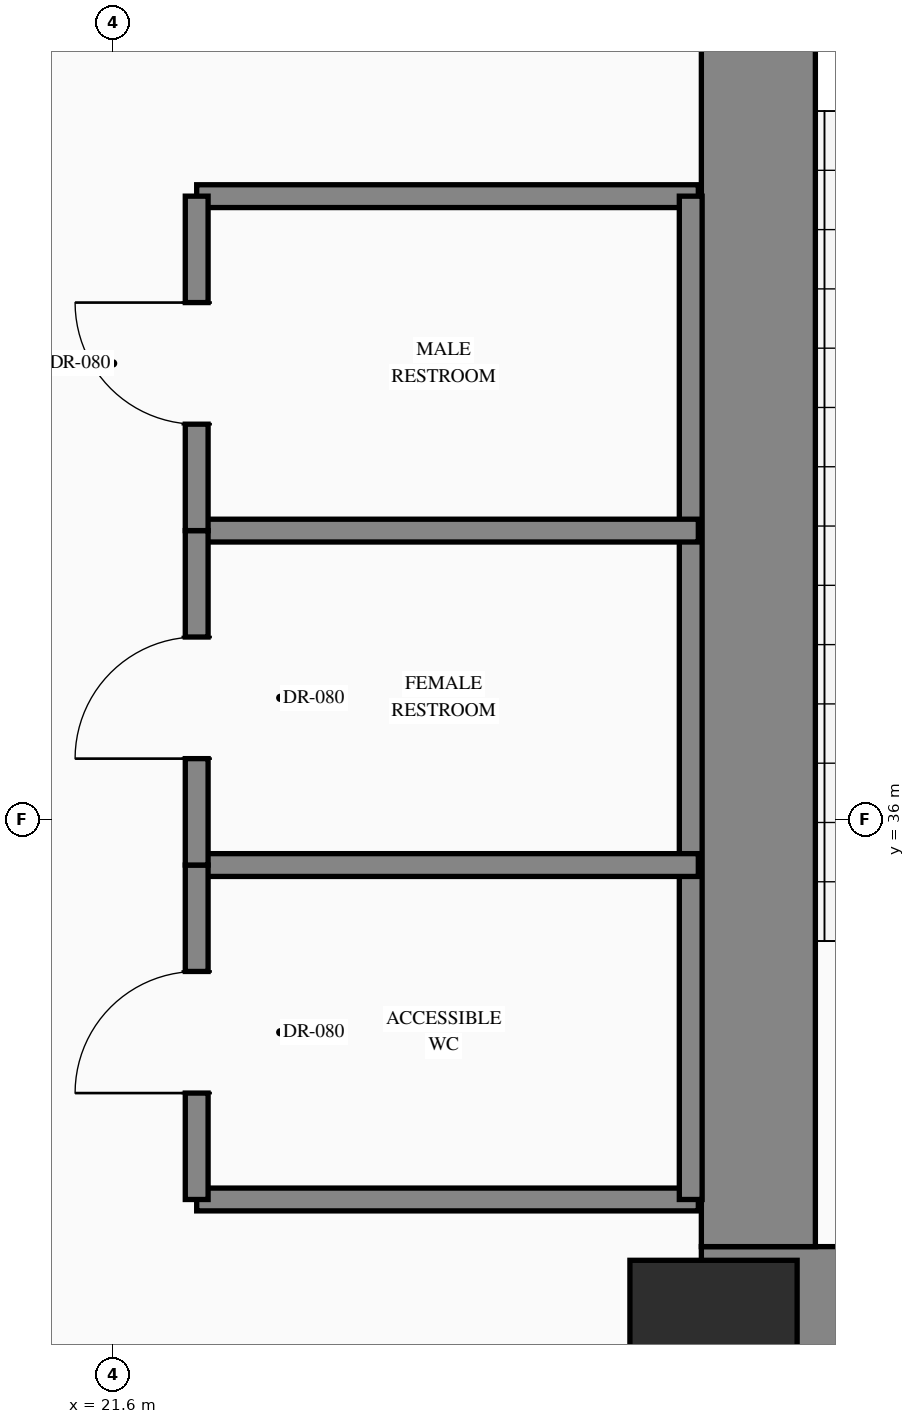
"""IFC4 building model, lengths in metres.
Left out: names, types, materials, properties, quantities, classifications, styles, units other than length and angle.
Written with IfcOpenShell. Run it as: python <this file> out.ifc"""

import sys

from ifc_helpers import new_model, si_unit, direction, frame, frame_2d, origin, origin_2d, place, context, subcontext, project, spatial, rectangle, extrude, element, fill, save


model = new_model("IFC4")
c1 = context("Model", 3, precision=1e-05, world=origin(), true_north=direction((0.0, 1.0)))
c2 = subcontext(c1, "Body", "Model", "MODEL_VIEW")
j1 = project(units=[si_unit("LENGTHUNIT", "METRE"), si_unit("PLANEANGLEUNIT", "RADIAN")], contexts=[c1])
p1 = place(None, origin())
s1 = spatial("IfcSite", under=j1, at=p1, CompositionType="ELEMENT")
p2 = place(p1, origin())
s2 = spatial("IfcBuilding", under=s1, at=p2, CompositionType="ELEMENT")
p3 = place(p2, origin())
s3 = spatial("IfcBuildingStorey", under=s2, at=p3, CompositionType="ELEMENT", Elevation=0.0)
p4 = place(p3, frame((25.47, 32.815, 0.0), z_axis=(0.0, 0.0, 1.0), x_axis=(1.0, 0.0, 0.0)))
e1 = element("IfcWall", 1, at=p4, inside=s3, PredefinedType="SHEAR", context=c2, shape_type="SweptSolid", body=[
    extrude(rectangle(XDim=8.08, YDim=0.75, at=frame_2d((4.04, 0.0))), origin(), (0.0, 0.0, 1.0), 5.4),
])
p5 = place(p4, frame((2.98, 0.0, 0.0)))
e2 = element("IfcOpeningElement", 2, at=p5, cuts=e1, PredefinedType="OPENING", context=c2, shape_type="SweptSolid", body=[
    extrude(rectangle(XDim=1.1, YDim=2.2, at=frame_2d((0.55, 1.1))), frame((0.0, 0.385, 0.0), z_axis=(0.0, -1.0, 0.0), x_axis=(1.0, 0.0, 0.0)), (0.0, 0.0, 1.0), 0.77),
])
p6 = place(p4, frame((5.73, 0.0, 0.0)))
e3 = element("IfcOpeningElement", 3, at=p6, cuts=e1, PredefinedType="OPENING", context=c2, shape_type="SweptSolid", body=[
    extrude(rectangle(XDim=1.1, YDim=2.15, at=frame_2d((0.55, 1.075))), frame((0.0, 0.385, 0.0), z_axis=(0.0, -1.0, 0.0), x_axis=(1.0, 0.0, 0.0)), (0.0, 0.0, 1.0), 0.77),
])
p7 = place(p3, frame((25.845, 33.19, 0.0), z_axis=(0.0, 0.0, 1.0), x_axis=(0.0, 1.0, 0.0)))
e4 = element("IfcWall", 4, at=p7, inside=s3, PredefinedType="SHEAR", context=c2, shape_type="SweptSolid", body=[
    extrude(rectangle(XDim=9.48, YDim=0.75, at=frame_2d((4.74, 0.0))), origin(), (0.0, 0.0, 1.0), 5.4),
])
p8 = place(p3, frame((25.55, 32.55, 0.0), z_axis=(0.0, 0.0, 1.0), x_axis=(1.0, 0.0, 0.0)))
e5 = element("IfcColumn", 5, at=p8, inside=s3, PredefinedType="COLUMN", context=c2, shape_type="SweptSolid", body=[
    extrude(rectangle(XDim=1.1, YDim=1.1, at=origin_2d()), origin(), (0.0, 0.0, 1.0), 5.4),
])
for number, where, z_axis, x_axis in (
    (6, (22.15, 33.5, 0.0), (0.0, 0.0, 1.0), (1.0, 0.0, 0.0)),
    (7, (22.15, 40.1, 0.0), (0.0, 0.0, 1.0), (1.0, 0.0, 0.0)),
):
    element("IfcWall", number, at=place(p3, frame(where, z_axis=z_axis, x_axis=x_axis)), inside=s3, PredefinedType="PARTITIONING", context=c2, shape_type="SweptSolid", body=[
        extrude(rectangle(XDim=3.3, YDim=0.15, at=frame_2d((1.65, 0.0))), origin(), (0.0, 0.0, 1.0), 5.1),
    ])
p9 = place(p3, frame((25.4, 33.5, 0.0), z_axis=(0.0, 0.0, 1.0), x_axis=(0.0, 1.0, 0.0)))
e8 = element("IfcWall", 8, at=p9, inside=s3, PredefinedType="PARTITIONING", context=c2, shape_type="SweptSolid", body=[
    extrude(rectangle(XDim=6.6, YDim=0.15, at=frame_2d((3.3, 0.0))), origin(), (0.0, 0.0, 1.0), 5.1),
])
for number, where, z_axis, x_axis in (
    (9, (22.15, 35.7, 0.0), (0.0, 0.0, 1.0), (1.0, 0.0, 0.0)),
    (10, (22.15, 37.9, 0.0), (0.0, 0.0, 1.0), (1.0, 0.0, 0.0)),
):
    element("IfcWall", number, at=place(p3, frame(where, z_axis=z_axis, x_axis=x_axis)), inside=s3, PredefinedType="PARTITIONING", context=c2, shape_type="SweptSolid", body=[
        extrude(rectangle(XDim=3.3, YDim=0.15, at=frame_2d((1.65, 0.0))), origin(), (0.0, 0.0, 1.0), 5.1),
    ])
p10 = place(p3, frame((22.15, 33.5, 0.0), z_axis=(0.0, 0.0, 1.0), x_axis=(0.0, 1.0, 0.0)))
e11 = element("IfcWall", 11, at=p10, inside=s3, PredefinedType="PARTITIONING", context=c2, shape_type="SweptSolid", body=[
    extrude(rectangle(XDim=2.2, YDim=0.15, at=frame_2d((1.1, 0.0))), origin(), (0.0, 0.0, 1.0), 5.1),
])
p11 = place(p10, frame((0.7, 0.0, 0.0)))
e12 = element("IfcOpeningElement", 12, at=p11, cuts=e11, PredefinedType="OPENING", context=c2, shape_type="SweptSolid", body=[
    extrude(rectangle(XDim=0.8, YDim=2.06, at=frame_2d((0.4, 1.03))), frame((0.0, 0.085, 0.0), z_axis=(0.0, -1.0, 0.0), x_axis=(1.0, 0.0, 0.0)), (0.0, 0.0, 1.0), 0.17),
])
p12 = place(p3, frame((22.15, 35.7, 0.0), z_axis=(0.0, 0.0, 1.0), x_axis=(0.0, 1.0, 0.0)))
e13 = element("IfcWall", 13, at=p12, inside=s3, PredefinedType="PARTITIONING", context=c2, shape_type="SweptSolid", body=[
    extrude(rectangle(XDim=2.2, YDim=0.15, at=frame_2d((1.1, 0.0))), origin(), (0.0, 0.0, 1.0), 5.1),
])
p13 = place(p12, frame((0.7, 0.0, 0.0)))
e14 = element("IfcOpeningElement", 14, at=p13, cuts=e13, PredefinedType="OPENING", context=c2, shape_type="SweptSolid", body=[
    extrude(rectangle(XDim=0.8, YDim=2.06, at=frame_2d((0.4, 1.03))), frame((0.0, 0.085, 0.0), z_axis=(0.0, -1.0, 0.0), x_axis=(1.0, 0.0, 0.0)), (0.0, 0.0, 1.0), 0.17),
])
p14 = place(p3, frame((22.15, 37.9, 0.0), z_axis=(0.0, 0.0, 1.0), x_axis=(0.0, 1.0, 0.0)))
e15 = element("IfcWall", 15, at=p14, inside=s3, PredefinedType="PARTITIONING", context=c2, shape_type="SweptSolid", body=[
    extrude(rectangle(XDim=2.2, YDim=0.15, at=frame_2d((1.1, 0.0))), origin(), (0.0, 0.0, 1.0), 5.1),
])
p15 = place(p14, frame((0.7, 0.0, 0.0)))
e16 = element("IfcOpeningElement", 16, at=p15, cuts=e15, PredefinedType="OPENING", context=c2, shape_type="SweptSolid", body=[
    extrude(rectangle(XDim=0.8, YDim=2.06, at=frame_2d((0.4, 1.03))), frame((0.0, 0.085, 0.0), z_axis=(0.0, -1.0, 0.0), x_axis=(1.0, 0.0, 0.0)), (0.0, 0.0, 1.0), 0.17),
])
p16 = place(p11, origin())
e17 = element("IfcDoor", 17, at=p16, inside=s3, OperationType="SINGLE_SWING_LEFT", PredefinedType="DOOR", context=c2, shape_type="SweptSolid", body=[
    extrude(rectangle(XDim=0.8, YDim=2.06, at=frame_2d((0.4, 1.03))), frame((0.0, 0.025, 0.0), z_axis=(0.0, -1.0, 0.0), x_axis=(1.0, 0.0, 0.0)), (0.0, 0.0, 1.0), 0.05),
])
fill(e12, e17)
p17 = place(p13, origin())
e18 = element("IfcDoor", 18, at=p17, inside=s3, OperationType="SINGLE_SWING_LEFT", PredefinedType="DOOR", context=c2, shape_type="SweptSolid", body=[
    extrude(rectangle(XDim=0.8, YDim=2.06, at=frame_2d((0.4, 1.03))), frame((0.0, 0.025, 0.0), z_axis=(0.0, -1.0, 0.0), x_axis=(1.0, 0.0, 0.0)), (0.0, 0.0, 1.0), 0.05),
])
fill(e14, e18)
p18 = place(p15, origin())
e19 = element("IfcDoor", 19, at=p18, inside=s3, OperationType="SINGLE_SWING_RIGHT", PredefinedType="DOOR", context=c2, shape_type="SweptSolid", body=[
    extrude(rectangle(XDim=0.8, YDim=2.06, at=frame_2d((0.4, 1.03))), frame((0.0, 0.025, 0.0), z_axis=(0.0, -1.0, 0.0), x_axis=(1.0, 0.0, 0.0)), (0.0, 0.0, 1.0), 0.05),
])
fill(e16, e19)
save(model, sys.argv[1])
